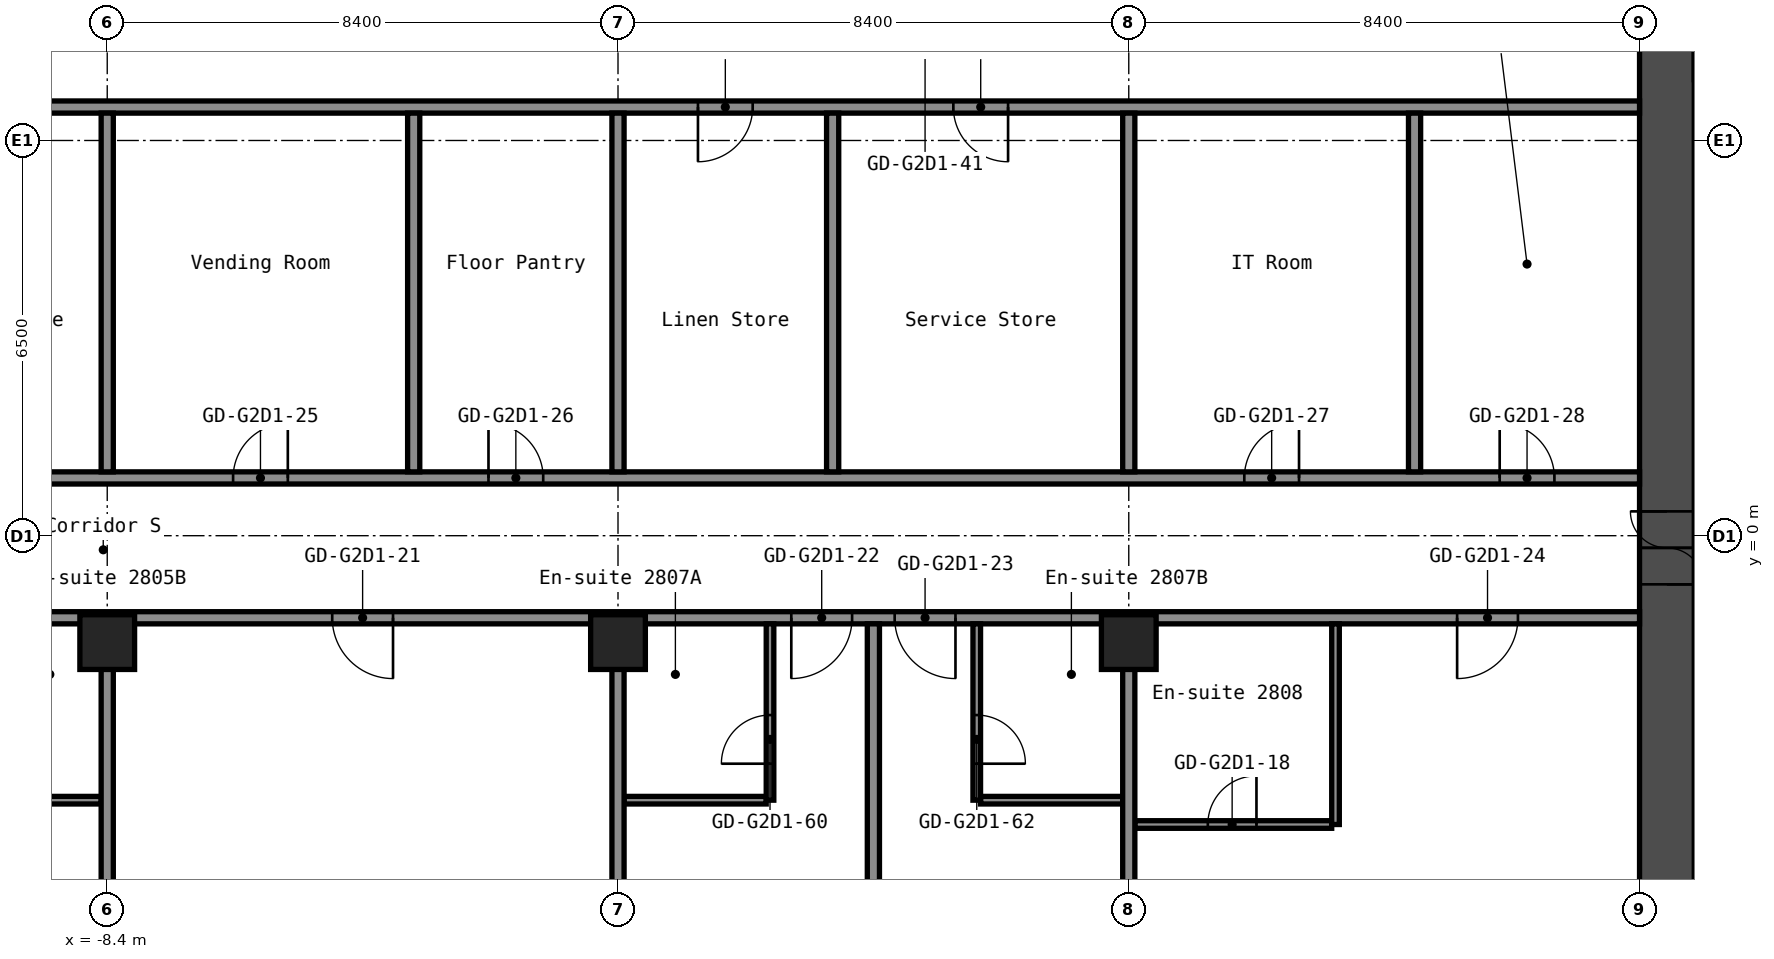
"""IFC4 building model, lengths in metres.
Left out: names, types, materials, properties, quantities, classifications, styles, units other than length and angle.
Written with IfcOpenShell. Run it as: python <this file> out.ifc"""

import sys

from ifc_helpers import new_model, si_unit, direction, frame, frame_2d, origin, origin_2d, place, context, subcontext, project, spatial, rectangle, hollow_rectangle, extrude, element, fill, save


model = new_model("IFC4")
c1 = context("Model", 3, precision=1e-05, world=origin(), true_north=direction((0.0, 1.0)))
c2 = subcontext(c1, "Body", "Model", "MODEL_VIEW")
j1 = project(units=[si_unit("LENGTHUNIT", "METRE"), si_unit("PLANEANGLEUNIT", "RADIAN")], contexts=[c1])
p1 = place(None, origin())
s1 = spatial("IfcSite", under=j1, at=p1, CompositionType="ELEMENT")
p2 = place(p1, origin())
s2 = spatial("IfcBuilding", under=s1, at=p2, CompositionType="ELEMENT")
p3 = place(p2, frame((0.0, 0.0, 101.0)))
s3 = spatial("IfcBuildingStorey", under=s2, at=p3, CompositionType="ELEMENT", Elevation=101.0)
for number, where, z_axis, x_axis in (
    (1, (-8.4, -1.75, 0.0), (0.0, 0.0, 1.0), (1.0, 0.0, 0.0)),
    (2, (0.0, -1.75, 0.0), (0.0, 0.0, 1.0), (1.0, 0.0, 0.0)),
    (3, (8.4, -1.75, 0.0), (0.0, 0.0, 1.0), (1.0, 0.0, 0.0)),
):
    element("IfcColumn", number, at=place(p3, frame(where, z_axis=z_axis, x_axis=x_axis)), inside=s3, PredefinedType="COLUMN", context=c2, shape_type="SweptSolid", body=[
        extrude(hollow_rectangle(XDim=0.9, YDim=0.9, WallThickness=0.036, at=origin_2d()), origin(), (0.0, 0.0, 1.0), 2.8),
    ])
p4 = place(p3, frame((17.25, -8.4, 0.0), z_axis=(0.0, 0.0, 1.0), x_axis=(0.0, 1.0, 0.0)))
e4 = element("IfcWall", 4, at=p4, inside=s3, PredefinedType="SHEAR", context=c2, shape_type="SweptSolid", body=[
    extrude(rectangle(XDim=16.8, YDim=0.9, at=frame_2d((8.4, 0.0))), origin(), (0.0, 0.0, 1.0), 2.8),
])
p5 = place(p4, frame((7.6, 0.0, 0.0)))
e5 = element("IfcOpeningElement", 5, at=p5, cuts=e4, PredefinedType="OPENING", context=c2, shape_type="SweptSolid", body=[
    extrude(rectangle(XDim=1.2, YDim=2.1, at=frame_2d((0.6, 1.05))), frame((0.0, 0.46, 0.0), z_axis=(0.0, -1.0, 0.0), x_axis=(1.0, 0.0, 0.0)), (0.0, 0.0, 1.0), 0.92),
])
p6 = place(p3, frame((8.5, -4.75, 0.0), z_axis=(0.0, 0.0, 1.0), x_axis=(1.0, 0.0, 0.0)))
e6 = element("IfcWall", 6, at=p6, inside=s3, PredefinedType="PARTITIONING", context=c2, shape_type="SweptSolid", body=[
    extrude(rectangle(XDim=3.238, YDim=0.125, at=frame_2d((1.619, 0.0))), origin(), (0.0, 0.0, 1.0), 2.8),
])
p7 = place(p6, frame((1.2, 0.0, 0.0)))
e7 = element("IfcOpeningElement", 7, at=p7, cuts=e6, PredefinedType="OPENING", context=c2, shape_type="SweptSolid", body=[
    extrude(rectangle(XDim=0.8, YDim=2.1, at=frame_2d((0.4, 1.05))), frame((0.0, 0.073, 0.0), z_axis=(0.0, -1.0, 0.0), x_axis=(1.0, 0.0, 0.0)), (0.0, 0.0, 1.0), 0.145),
])
for number, where, z_axis, x_axis in (
    (8, (-10.837, -4.35, 0.0), (0.0, 0.0, 1.0), (1.0, 0.0, 0.0)),
    (9, (0.1, -4.35, 0.0), (0.0, 0.0, 1.0), (1.0, 0.0, 0.0)),
):
    element("IfcWall", number, at=place(p3, frame(where, z_axis=z_axis, x_axis=x_axis)), inside=s3, PredefinedType="PARTITIONING", context=c2, shape_type="SweptSolid", body=[
        extrude(rectangle(XDim=2.337, YDim=0.125, at=frame_2d((1.169, 0.0))), origin(), (0.0, 0.0, 1.0), 2.8),
    ])
p8 = place(p3, frame((5.962, -4.35, 0.0), z_axis=(0.0, 0.0, 1.0), x_axis=(1.0, 0.0, 0.0)))
e10 = element("IfcWall", 10, at=p8, inside=s3, PredefinedType="PARTITIONING", context=c2, shape_type="SweptSolid", body=[
    extrude(rectangle(XDim=2.338, YDim=0.125, at=frame_2d((1.169, 0.0))), origin(), (0.0, 0.0, 1.0), 2.8),
])
p9 = place(p3, frame((-16.8, -1.35, 0.0), z_axis=(0.0, 0.0, 1.0), x_axis=(1.0, 0.0, 0.0)))
e11 = element("IfcWall", 11, at=p9, inside=s3, PredefinedType="PARTITIONING", context=c2, shape_type="SweptSolid", body=[
    extrude(rectangle(XDim=33.6, YDim=0.2, at=frame_2d((16.8, 0.0))), origin(), (0.0, 0.0, 1.0), 2.8),
])
p10 = place(p9, frame((2.85, 0.0, 0.0)))
e12 = element("IfcOpeningElement", 12, at=p10, cuts=e11, PredefinedType="OPENING", context=c2, shape_type="SweptSolid", body=[
    extrude(rectangle(XDim=1.0, YDim=2.1, at=frame_2d((0.5, 1.05))), frame((0.0, 0.11, 0.0), z_axis=(0.0, -1.0, 0.0), x_axis=(1.0, 0.0, 0.0)), (0.0, 0.0, 1.0), 0.22),
])
p11 = place(p9, frame((4.55, 0.0, 0.0)))
e13 = element("IfcOpeningElement", 13, at=p11, cuts=e11, PredefinedType="OPENING", context=c2, shape_type="SweptSolid", body=[
    extrude(rectangle(XDim=1.0, YDim=2.1, at=frame_2d((0.5, 1.05))), frame((0.0, 0.11, 0.0), z_axis=(0.0, -1.0, 0.0), x_axis=(1.0, 0.0, 0.0)), (0.0, 0.0, 1.0), 0.22),
])
p12 = place(p9, frame((12.1, 0.0, 0.0)))
e14 = element("IfcOpeningElement", 14, at=p12, cuts=e11, PredefinedType="OPENING", context=c2, shape_type="SweptSolid", body=[
    extrude(rectangle(XDim=1.0, YDim=2.1, at=frame_2d((0.5, 1.05))), frame((0.0, 0.11, 0.0), z_axis=(0.0, -1.0, 0.0), x_axis=(1.0, 0.0, 0.0)), (0.0, 0.0, 1.0), 0.22),
])
p13 = place(p9, frame((19.65, 0.0, 0.0)))
e15 = element("IfcOpeningElement", 15, at=p13, cuts=e11, PredefinedType="OPENING", context=c2, shape_type="SweptSolid", body=[
    extrude(rectangle(XDim=1.0, YDim=2.1, at=frame_2d((0.5, 1.05))), frame((0.0, 0.11, 0.0), z_axis=(0.0, -1.0, 0.0), x_axis=(1.0, 0.0, 0.0)), (0.0, 0.0, 1.0), 0.22),
])
p14 = place(p9, frame((21.35, 0.0, 0.0)))
e16 = element("IfcOpeningElement", 16, at=p14, cuts=e11, PredefinedType="OPENING", context=c2, shape_type="SweptSolid", body=[
    extrude(rectangle(XDim=1.0, YDim=2.1, at=frame_2d((0.5, 1.05))), frame((0.0, 0.11, 0.0), z_axis=(0.0, -1.0, 0.0), x_axis=(1.0, 0.0, 0.0)), (0.0, 0.0, 1.0), 0.22),
])
p15 = place(p9, frame((30.6, 0.0, 0.0)))
e17 = element("IfcOpeningElement", 17, at=p15, cuts=e11, PredefinedType="OPENING", context=c2, shape_type="SweptSolid", body=[
    extrude(rectangle(XDim=1.0, YDim=2.1, at=frame_2d((0.5, 1.05))), frame((0.0, 0.11, 0.0), z_axis=(0.0, -1.0, 0.0), x_axis=(1.0, 0.0, 0.0)), (0.0, 0.0, 1.0), 0.22),
])
p16 = place(p3, frame((-16.8, 0.95, 0.0), z_axis=(0.0, 0.0, 1.0), x_axis=(1.0, 0.0, 0.0)))
e18 = element("IfcWall", 18, at=p16, inside=s3, PredefinedType="PARTITIONING", context=c2, shape_type="SweptSolid", body=[
    extrude(rectangle(XDim=33.6, YDim=0.2, at=frame_2d((16.8, 0.0))), origin(), (0.0, 0.0, 1.0), 2.8),
])
p17 = place(p16, frame((10.47, 0.0, 0.0)))
e19 = element("IfcOpeningElement", 19, at=p17, cuts=e18, PredefinedType="OPENING", context=c2, shape_type="SweptSolid", body=[
    extrude(rectangle(XDim=0.9, YDim=2.1, at=frame_2d((0.45, 1.05))), frame((0.0, 0.11, 0.0), z_axis=(0.0, -1.0, 0.0), x_axis=(1.0, 0.0, 0.0)), (0.0, 0.0, 1.0), 0.22),
])
p18 = place(p16, frame((14.67, 0.0, 0.0)))
e20 = element("IfcOpeningElement", 20, at=p18, cuts=e18, PredefinedType="OPENING", context=c2, shape_type="SweptSolid", body=[
    extrude(rectangle(XDim=0.9, YDim=2.1, at=frame_2d((0.45, 1.05))), frame((0.0, 0.11, 0.0), z_axis=(0.0, -1.0, 0.0), x_axis=(1.0, 0.0, 0.0)), (0.0, 0.0, 1.0), 0.22),
])
p19 = place(p16, frame((27.1, 0.0, 0.0)))
e21 = element("IfcOpeningElement", 21, at=p19, cuts=e18, PredefinedType="OPENING", context=c2, shape_type="SweptSolid", body=[
    extrude(rectangle(XDim=0.9, YDim=2.1, at=frame_2d((0.45, 1.05))), frame((0.0, 0.11, 0.0), z_axis=(0.0, -1.0, 0.0), x_axis=(1.0, 0.0, 0.0)), (0.0, 0.0, 1.0), 0.22),
])
p20 = place(p16, frame((31.3, 0.0, 0.0)))
e22 = element("IfcOpeningElement", 22, at=p20, cuts=e18, PredefinedType="OPENING", context=c2, shape_type="SweptSolid", body=[
    extrude(rectangle(XDim=0.9, YDim=2.1, at=frame_2d((0.45, 1.05))), frame((0.0, 0.11, 0.0), z_axis=(0.0, -1.0, 0.0), x_axis=(1.0, 0.0, 0.0)), (0.0, 0.0, 1.0), 0.22),
])
p21 = place(p3, frame((-16.8, 7.05, 0.0), z_axis=(0.0, 0.0, 1.0), x_axis=(1.0, 0.0, 0.0)))
e23 = element("IfcWall", 23, at=p21, inside=s3, PredefinedType="PARTITIONING", context=c2, shape_type="SweptSolid", body=[
    extrude(rectangle(XDim=33.6, YDim=0.2, at=frame_2d((16.8, 0.0))), origin(), (0.0, 0.0, 1.0), 2.8),
])
p22 = place(p21, frame((1.985, 0.0, 0.0)))
e24 = element("IfcOpeningElement", 24, at=p22, cuts=e23, PredefinedType="OPENING", context=c2, shape_type="SweptSolid", body=[
    extrude(rectangle(XDim=0.9, YDim=2.1, at=frame_2d((0.45, 1.05))), frame((0.0, 0.11, 0.0), z_axis=(0.0, -1.0, 0.0), x_axis=(1.0, 0.0, 0.0)), (0.0, 0.0, 1.0), 0.22),
])
p23 = place(p21, frame((6.185, 0.0, 0.0)))
e25 = element("IfcOpeningElement", 25, at=p23, cuts=e23, PredefinedType="OPENING", context=c2, shape_type="SweptSolid", body=[
    extrude(rectangle(XDim=0.9, YDim=2.1, at=frame_2d((0.45, 1.05))), frame((0.0, 0.11, 0.0), z_axis=(0.0, -1.0, 0.0), x_axis=(1.0, 0.0, 0.0)), (0.0, 0.0, 1.0), 0.22),
])
p24 = place(p21, frame((18.115, 0.0, 0.0)))
e26 = element("IfcOpeningElement", 26, at=p24, cuts=e23, PredefinedType="OPENING", context=c2, shape_type="SweptSolid", body=[
    extrude(rectangle(XDim=0.9, YDim=2.1, at=frame_2d((0.45, 1.05))), frame((0.0, 0.11, 0.0), z_axis=(0.0, -1.0, 0.0), x_axis=(1.0, 0.0, 0.0)), (0.0, 0.0, 1.0), 0.22),
])
p25 = place(p21, frame((22.315, 0.0, 0.0)))
e27 = element("IfcOpeningElement", 27, at=p25, cuts=e23, PredefinedType="OPENING", context=c2, shape_type="SweptSolid", body=[
    extrude(rectangle(XDim=0.9, YDim=2.1, at=frame_2d((0.45, 1.05))), frame((0.0, 0.11, 0.0), z_axis=(0.0, -1.0, 0.0), x_axis=(1.0, 0.0, 0.0)), (0.0, 0.0, 1.0), 0.22),
])
p26 = place(p3, frame((-8.4, -15.55, 0.0), z_axis=(0.0, 0.0, 1.0), x_axis=(0.0, 1.0, 0.0)))
e28 = element("IfcWall", 28, at=p26, inside=s3, PredefinedType="PARTITIONING", context=c2, shape_type="SweptSolid", body=[
    extrude(rectangle(XDim=13.36, YDim=0.2, at=frame_2d((6.68, 0.0))), origin(), (0.0, 0.0, 1.0), 2.8),
])
for number, where, z_axis, x_axis in (
    (29, (-8.4, 1.05, 0.0), (0.0, 0.0, 1.0), (0.0, 1.0, 0.0)),
    (30, (-3.36, 1.05, 0.0), (0.0, 0.0, 1.0), (0.0, 1.0, 0.0)),
):
    element("IfcWall", number, at=place(p3, frame(where, z_axis=z_axis, x_axis=x_axis)), inside=s3, PredefinedType="PARTITIONING", context=c2, shape_type="SweptSolid", body=[
        extrude(rectangle(XDim=5.9, YDim=0.2, at=frame_2d((2.95, 0.0))), origin(), (0.0, 0.0, 1.0), 2.8),
    ])
p27 = place(p3, frame((0.0, -15.55, 0.0), z_axis=(0.0, 0.0, 1.0), x_axis=(0.0, 1.0, 0.0)))
e31 = element("IfcWall", 31, at=p27, inside=s3, PredefinedType="PARTITIONING", context=c2, shape_type="SweptSolid", body=[
    extrude(rectangle(XDim=13.36, YDim=0.2, at=frame_2d((6.68, 0.0))), origin(), (0.0, 0.0, 1.0), 2.8),
])
p28 = place(p3, frame((0.0, 1.05, 0.0), z_axis=(0.0, 0.0, 1.0), x_axis=(0.0, 1.0, 0.0)))
e32 = element("IfcWall", 32, at=p28, inside=s3, PredefinedType="PARTITIONING", context=c2, shape_type="SweptSolid", body=[
    extrude(rectangle(XDim=5.9, YDim=0.2, at=frame_2d((2.95, 0.0))), origin(), (0.0, 0.0, 1.0), 2.8),
])
p29 = place(p3, frame((2.5, -4.35, 0.0), z_axis=(0.0, 0.0, 1.0), x_axis=(0.0, 1.0, 0.0)))
e33 = element("IfcWall", 33, at=p29, inside=s3, PredefinedType="PARTITIONING", context=c2, shape_type="SweptSolid", body=[
    extrude(rectangle(XDim=2.9, YDim=0.125, at=frame_2d((1.45, 0.0))), origin(), (0.0, 0.0, 1.0), 2.8),
])
p30 = place(p29, frame((0.6, 0.0, 0.0)))
e34 = element("IfcOpeningElement", 34, at=p30, cuts=e33, PredefinedType="OPENING", context=c2, shape_type="SweptSolid", body=[
    extrude(rectangle(XDim=0.8, YDim=2.1, at=frame_2d((0.4, 1.05))), frame((0.0, 0.073, 0.0), z_axis=(0.0, -1.0, 0.0), x_axis=(1.0, 0.0, 0.0)), (0.0, 0.0, 1.0), 0.145),
])
p31 = place(p3, frame((3.53, 1.05, 0.0), z_axis=(0.0, 0.0, 1.0), x_axis=(0.0, 1.0, 0.0)))
e35 = element("IfcWall", 35, at=p31, inside=s3, PredefinedType="PARTITIONING", context=c2, shape_type="SweptSolid", body=[
    extrude(rectangle(XDim=5.9, YDim=0.2, at=frame_2d((2.95, 0.0))), origin(), (0.0, 0.0, 1.0), 2.8),
])
p32 = place(p3, frame((4.2, -15.55, 0.0), z_axis=(0.0, 0.0, 1.0), x_axis=(0.0, 1.0, 0.0)))
e36 = element("IfcWall", 36, at=p32, inside=s3, PredefinedType="PARTITIONING", context=c2, shape_type="SweptSolid", body=[
    extrude(rectangle(XDim=14.1, YDim=0.2, at=frame_2d((7.05, 0.0))), origin(), (0.0, 0.0, 1.0), 2.8),
])
p33 = place(p3, frame((5.9, -4.35, 0.0), z_axis=(0.0, 0.0, 1.0), x_axis=(0.0, 1.0, 0.0)))
e37 = element("IfcWall", 37, at=p33, inside=s3, PredefinedType="PARTITIONING", context=c2, shape_type="SweptSolid", body=[
    extrude(rectangle(XDim=2.9, YDim=0.125, at=frame_2d((1.45, 0.0))), origin(), (0.0, 0.0, 1.0), 2.8),
])
p34 = place(p33, frame((0.6, 0.0, 0.0)))
e38 = element("IfcOpeningElement", 38, at=p34, cuts=e37, PredefinedType="OPENING", context=c2, shape_type="SweptSolid", body=[
    extrude(rectangle(XDim=0.8, YDim=2.1, at=frame_2d((0.4, 1.05))), frame((0.0, 0.073, 0.0), z_axis=(0.0, -1.0, 0.0), x_axis=(1.0, 0.0, 0.0)), (0.0, 0.0, 1.0), 0.145),
])
p35 = place(p3, frame((8.4, -15.55, 0.0), z_axis=(0.0, 0.0, 1.0), x_axis=(0.0, 1.0, 0.0)))
e39 = element("IfcWall", 39, at=p35, inside=s3, PredefinedType="PARTITIONING", context=c2, shape_type="SweptSolid", body=[
    extrude(rectangle(XDim=13.36, YDim=0.2, at=frame_2d((6.68, 0.0))), origin(), (0.0, 0.0, 1.0), 2.8),
])
p36 = place(p3, frame((8.4, 1.05, 0.0), z_axis=(0.0, 0.0, 1.0), x_axis=(0.0, 1.0, 0.0)))
e40 = element("IfcWall", 40, at=p36, inside=s3, PredefinedType="PARTITIONING", context=c2, shape_type="SweptSolid", body=[
    extrude(rectangle(XDim=5.9, YDim=0.2, at=frame_2d((2.95, 0.0))), origin(), (0.0, 0.0, 1.0), 2.8),
])
p37 = place(p3, frame((11.8, -4.75, 0.0), z_axis=(0.0, 0.0, 1.0), x_axis=(0.0, 1.0, 0.0)))
e41 = element("IfcWall", 41, at=p37, inside=s3, PredefinedType="PARTITIONING", context=c2, shape_type="SweptSolid", body=[
    extrude(rectangle(XDim=3.3, YDim=0.125, at=frame_2d((1.65, 0.0))), origin(), (0.0, 0.0, 1.0), 2.8),
])
p38 = place(p3, frame((13.1, 1.05, 0.0), z_axis=(0.0, 0.0, 1.0), x_axis=(0.0, 1.0, 0.0)))
e42 = element("IfcWall", 42, at=p38, inside=s3, PredefinedType="PARTITIONING", context=c2, shape_type="SweptSolid", body=[
    extrude(rectangle(XDim=5.9, YDim=0.2, at=frame_2d((2.95, 0.0))), origin(), (0.0, 0.0, 1.0), 2.8),
])
p39 = place(p5, origin())
e43 = element("IfcDoor", 43, at=p39, inside=s3, OperationType="DOUBLE_DOOR_SINGLE_SWING", PredefinedType="DOOR", context=c2, shape_type="SweptSolid", body=[
    extrude(rectangle(XDim=1.2, YDim=2.1, at=frame_2d((0.6, 1.05))), frame((0.0, 0.025, 0.0), z_axis=(0.0, -1.0, 0.0), x_axis=(1.0, 0.0, 0.0)), (0.0, 0.0, 1.0), 0.05),
])
fill(e5, e43)
p40 = place(p7, origin())
e44 = element("IfcDoor", 44, at=p40, inside=s3, OperationType="SINGLE_SWING_LEFT", PredefinedType="DOOR", context=c2, shape_type="SweptSolid", body=[
    extrude(rectangle(XDim=0.8, YDim=2.1, at=frame_2d((0.4, 1.05))), frame((0.0, 0.025, 0.0), z_axis=(0.0, -1.0, 0.0), x_axis=(1.0, 0.0, 0.0)), (0.0, 0.0, 1.0), 0.05),
])
fill(e7, e44)
p41 = place(p12, origin())
e45 = element("IfcDoor", 45, at=p41, inside=s3, OperationType="SINGLE_SWING_RIGHT", PredefinedType="DOOR", context=c2, shape_type="SweptSolid", body=[
    extrude(rectangle(XDim=1.0, YDim=2.1, at=frame_2d((0.5, 1.05))), frame((0.0, 0.025, 0.0), z_axis=(0.0, -1.0, 0.0), x_axis=(1.0, 0.0, 0.0)), (0.0, 0.0, 1.0), 0.05),
])
fill(e14, e45)
p42 = place(p13, origin())
e46 = element("IfcDoor", 46, at=p42, inside=s3, OperationType="SINGLE_SWING_LEFT", PredefinedType="DOOR", context=c2, shape_type="SweptSolid", body=[
    extrude(rectangle(XDim=1.0, YDim=2.1, at=frame_2d((0.5, 1.05))), frame((0.0, 0.025, 0.0), z_axis=(0.0, -1.0, 0.0), x_axis=(1.0, 0.0, 0.0)), (0.0, 0.0, 1.0), 0.05),
])
fill(e15, e46)
p43 = place(p14, origin())
e47 = element("IfcDoor", 47, at=p43, inside=s3, OperationType="SINGLE_SWING_RIGHT", PredefinedType="DOOR", context=c2, shape_type="SweptSolid", body=[
    extrude(rectangle(XDim=1.0, YDim=2.1, at=frame_2d((0.5, 1.05))), frame((0.0, 0.025, 0.0), z_axis=(0.0, -1.0, 0.0), x_axis=(1.0, 0.0, 0.0)), (0.0, 0.0, 1.0), 0.05),
])
fill(e16, e47)
p44 = place(p15, origin())
e48 = element("IfcDoor", 48, at=p44, inside=s3, OperationType="SINGLE_SWING_LEFT", PredefinedType="DOOR", context=c2, shape_type="SweptSolid", body=[
    extrude(rectangle(XDim=1.0, YDim=2.1, at=frame_2d((0.5, 1.05))), frame((0.0, 0.025, 0.0), z_axis=(0.0, -1.0, 0.0), x_axis=(1.0, 0.0, 0.0)), (0.0, 0.0, 1.0), 0.05),
])
fill(e17, e48)
p45 = place(p17, origin())
e49 = element("IfcDoor", 49, at=p45, inside=s3, OperationType="SINGLE_SWING_LEFT", PredefinedType="DOOR", context=c2, shape_type="SweptSolid", body=[
    extrude(rectangle(XDim=0.9, YDim=2.1, at=frame_2d((0.45, 1.05))), frame((0.0, 0.025, 0.0), z_axis=(0.0, -1.0, 0.0), x_axis=(1.0, 0.0, 0.0)), (0.0, 0.0, 1.0), 0.05),
])
fill(e19, e49)
p46 = place(p18, origin())
e50 = element("IfcDoor", 50, at=p46, inside=s3, OperationType="SINGLE_SWING_RIGHT", PredefinedType="DOOR", context=c2, shape_type="SweptSolid", body=[
    extrude(rectangle(XDim=0.9, YDim=2.1, at=frame_2d((0.45, 1.05))), frame((0.0, 0.025, 0.0), z_axis=(0.0, -1.0, 0.0), x_axis=(1.0, 0.0, 0.0)), (0.0, 0.0, 1.0), 0.05),
])
fill(e20, e50)
p47 = place(p19, origin())
e51 = element("IfcDoor", 51, at=p47, inside=s3, OperationType="SINGLE_SWING_LEFT", PredefinedType="DOOR", context=c2, shape_type="SweptSolid", body=[
    extrude(rectangle(XDim=0.9, YDim=2.1, at=frame_2d((0.45, 1.05))), frame((0.0, 0.025, 0.0), z_axis=(0.0, -1.0, 0.0), x_axis=(1.0, 0.0, 0.0)), (0.0, 0.0, 1.0), 0.05),
])
fill(e21, e51)
p48 = place(p20, origin())
e52 = element("IfcDoor", 52, at=p48, inside=s3, OperationType="SINGLE_SWING_RIGHT", PredefinedType="DOOR", context=c2, shape_type="SweptSolid", body=[
    extrude(rectangle(XDim=0.9, YDim=2.1, at=frame_2d((0.45, 1.05))), frame((0.0, 0.025, 0.0), z_axis=(0.0, -1.0, 0.0), x_axis=(1.0, 0.0, 0.0)), (0.0, 0.0, 1.0), 0.05),
])
fill(e22, e52)
p49 = place(p24, origin())
e53 = element("IfcDoor", 53, at=p49, inside=s3, OperationType="SINGLE_SWING_LEFT", PredefinedType="DOOR", context=c2, shape_type="SweptSolid", body=[
    extrude(rectangle(XDim=0.9, YDim=2.1, at=frame_2d((0.45, 1.05))), frame((0.0, 0.025, 0.0), z_axis=(0.0, -1.0, 0.0), x_axis=(1.0, 0.0, 0.0)), (0.0, 0.0, 1.0), 0.05),
])
fill(e26, e53)
p50 = place(p25, origin())
e54 = element("IfcDoor", 54, at=p50, inside=s3, OperationType="SINGLE_SWING_RIGHT", PredefinedType="DOOR", context=c2, shape_type="SweptSolid", body=[
    extrude(rectangle(XDim=0.9, YDim=2.1, at=frame_2d((0.45, 1.05))), frame((0.0, 0.025, 0.0), z_axis=(0.0, -1.0, 0.0), x_axis=(1.0, 0.0, 0.0)), (0.0, 0.0, 1.0), 0.05),
])
fill(e27, e54)
p51 = place(p30, origin())
e55 = element("IfcDoor", 55, at=p51, inside=s3, OperationType="SINGLE_SWING_RIGHT", PredefinedType="DOOR", context=c2, shape_type="SweptSolid", body=[
    extrude(rectangle(XDim=0.8, YDim=2.1, at=frame_2d((0.4, 1.05))), frame((0.0, 0.025, 0.0), z_axis=(0.0, -1.0, 0.0), x_axis=(1.0, 0.0, 0.0)), (0.0, 0.0, 1.0), 0.05),
])
fill(e34, e55)
p52 = place(p34, origin())
e56 = element("IfcDoor", 56, at=p52, inside=s3, OperationType="SINGLE_SWING_LEFT", PredefinedType="DOOR", context=c2, shape_type="SweptSolid", body=[
    extrude(rectangle(XDim=0.8, YDim=2.1, at=frame_2d((0.4, 1.05))), frame((0.0, 0.025, 0.0), z_axis=(0.0, -1.0, 0.0), x_axis=(1.0, 0.0, 0.0)), (0.0, 0.0, 1.0), 0.05),
])
fill(e38, e56)
save(model, sys.argv[1])
